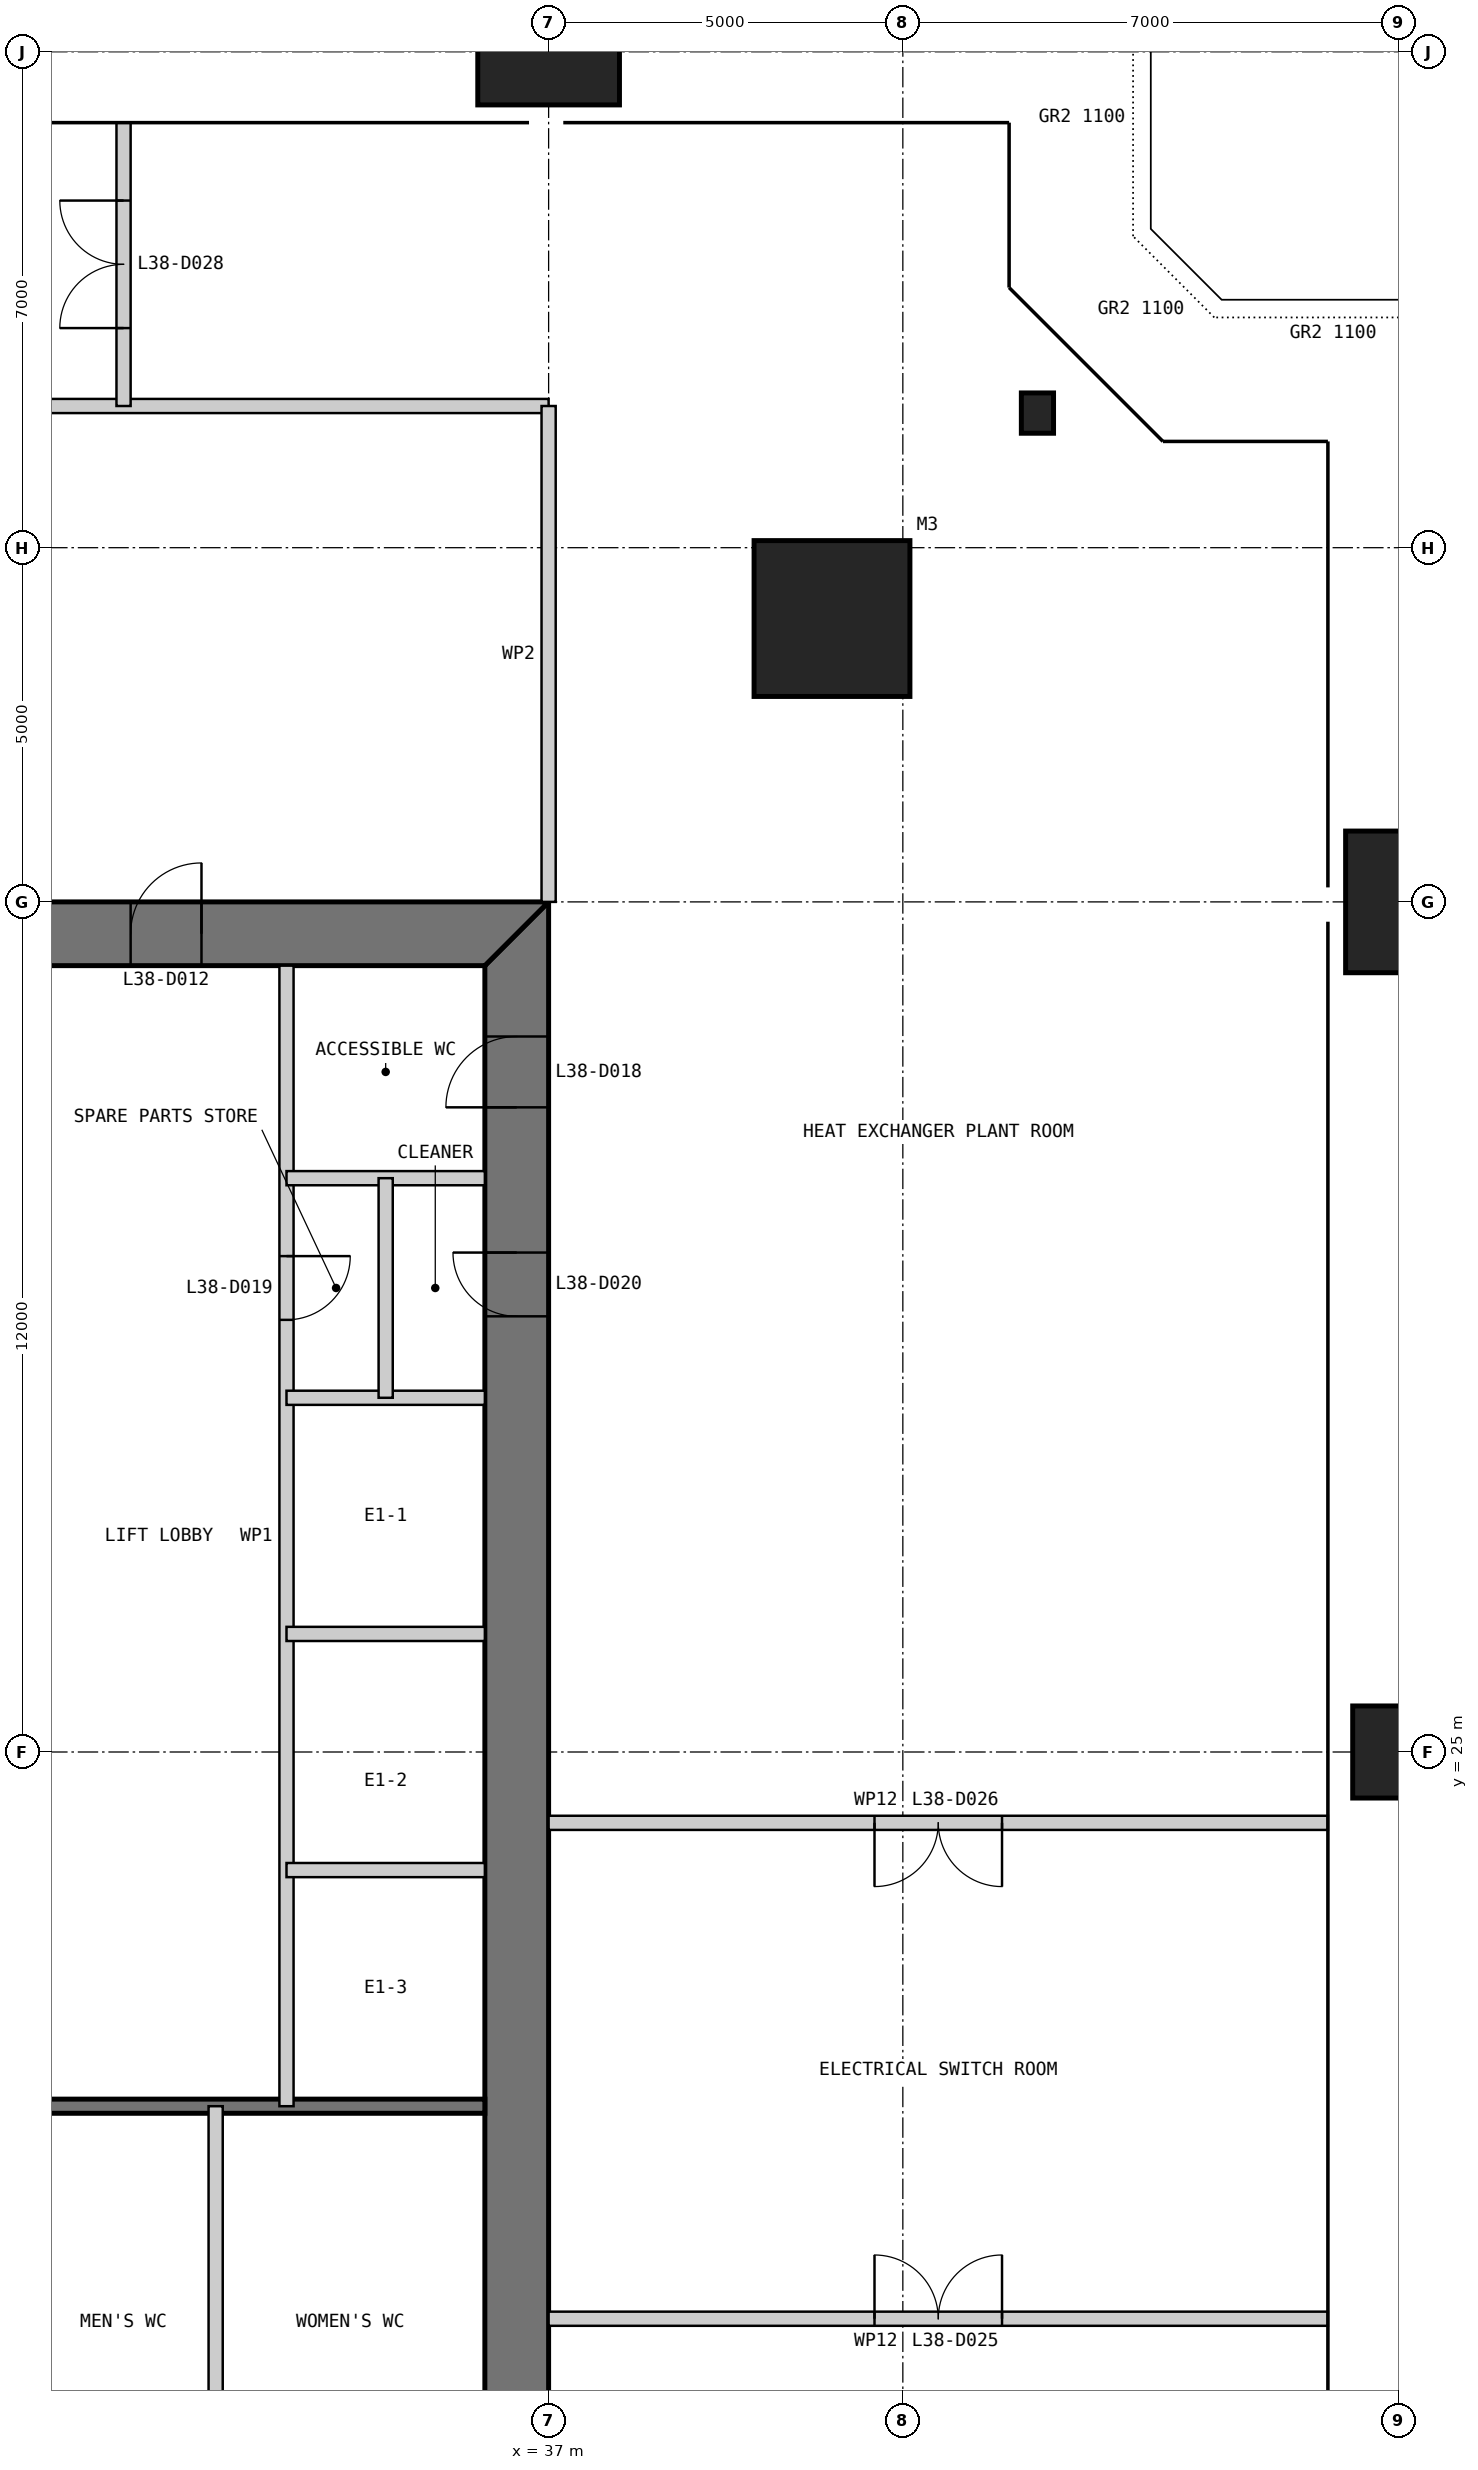
"""IFC4 building model, lengths in metres.
Left out: names, types, materials, properties, quantities, classifications, styles, units other than length and angle.
Written with IfcOpenShell. Run it as: python <this file> out.ifc"""

import sys

from ifc_helpers import new_model, si_unit, direction, frame, frame_2d, origin, origin_2d, place, context, subcontext, project, spatial, polyline, rectangle, i_section, outline, extrude, element, fill, save


model = new_model("IFC4")
c1 = context("Model", 3, precision=1e-05, world=origin(), true_north=direction((0.0, 1.0)))
c2 = subcontext(c1, "Body", "Model", "MODEL_VIEW")
j1 = project(units=[si_unit("LENGTHUNIT", "METRE"), si_unit("PLANEANGLEUNIT", "RADIAN")], contexts=[c1])
p1 = place(None, origin())
s1 = spatial("IfcSite", under=j1, at=p1, CompositionType="ELEMENT")
p2 = place(p1, origin())
s2 = spatial("IfcBuilding", under=s1, at=p2, CompositionType="ELEMENT")
p3 = place(p2, frame((0.0, 0.0, 162.4)))
s3 = spatial("IfcBuildingStorey", under=s2, at=p3, CompositionType="ELEMENT", Elevation=162.4)
p4 = place(p3, frame((41.0, 41.0, 0.0), z_axis=(0.0, 0.0, 1.0), x_axis=(1.0, 0.0, 0.0)))
e1 = element("IfcColumn", 1, at=p4, inside=s3, PredefinedType="COLUMN", context=c2, shape_type="SweptSolid", body=[
    extrude(rectangle(XDim=2.2, YDim=2.2, at=origin_2d()), origin(), (0.0, 0.0, 1.0), 6.0),
])
p5 = place(p3, frame((49.0, 25.0, 0.0), z_axis=(0.0, 0.0, 1.0), x_axis=(1.0, 0.0, 0.0)))
e2 = element("IfcColumn", 2, at=p5, inside=s3, PredefinedType="COLUMN", context=c2, shape_type="SweptSolid", body=[
    extrude(rectangle(XDim=1.3, YDim=1.3, at=origin_2d()), origin(), (0.0, 0.0, 1.0), 6.0),
])
p6 = place(p3, frame((49.0, 37.0, 0.0), z_axis=(0.0, 0.0, 1.0), x_axis=(1.0, 0.0, 0.0)))
e3 = element("IfcColumn", 3, at=p6, inside=s3, PredefinedType="COLUMN", context=c2, shape_type="SweptSolid", body=[
    extrude(rectangle(XDim=1.5, YDim=2.0, at=origin_2d()), origin(), (0.0, 0.0, 1.0), 6.0),
])
p7 = place(p3, frame((37.0, 49.0, 0.0), z_axis=(0.0, 0.0, 1.0), x_axis=(1.0, 0.0, 0.0)))
e4 = element("IfcColumn", 4, at=p7, inside=s3, PredefinedType="COLUMN", context=c2, shape_type="SweptSolid", body=[
    extrude(rectangle(XDim=2.0, YDim=1.5, at=origin_2d()), origin(), (0.0, 0.0, 1.0), 6.0),
])
p8 = place(p3, frame((43.9, 43.9, 0.0), z_axis=(0.0, 0.0, 1.0), x_axis=(1.0, 0.0, 0.0)))
e5 = element("IfcColumn", 5, at=p8, inside=s3, PredefinedType="COLUMN", context=c2, shape_type="SweptSolid", body=[
    extrude(i_section(OverallWidth=0.455, OverallDepth=0.569, WebThickness=0.078, FlangeThickness=0.125, at=origin_2d()), origin(), (0.0, 0.0, 1.0), 4.6),
])
p9 = place(p3, frame((36.55, 13.9, 0.0), z_axis=(0.0, 0.0, 1.0), x_axis=(0.0, 1.0, 0.0)))
e6 = element("IfcWall", 6, at=p9, inside=s3, PredefinedType="SHEAR", context=c2, shape_type="SweptSolid", body=[
    extrude(outline(polyline([(-0.9, -0.45), (23.1, -0.45), (22.2, 0.45), (0.0, 0.45), (-0.9, -0.45)])), origin(), (0.0, 0.0, 1.0), 6.0),
])
p10 = place(p9, frame((20.2, 0.0, 0.0)))
e7 = element("IfcOpeningElement", 7, at=p10, cuts=e6, PredefinedType="OPENING", context=c2, shape_type="SweptSolid", body=[
    extrude(rectangle(XDim=1.0, YDim=2.2, at=frame_2d((0.5, 1.1))), frame((0.0, 0.46, 0.0), z_axis=(0.0, -1.0, 0.0), x_axis=(1.0, 0.0, 0.0)), (0.0, 0.0, 1.0), 0.92),
])
p11 = place(p9, frame((17.25, 0.0, 0.0)))
e8 = element("IfcOpeningElement", 8, at=p11, cuts=e6, PredefinedType="OPENING", context=c2, shape_type="SweptSolid", body=[
    extrude(rectangle(XDim=0.9, YDim=2.2, at=frame_2d((0.45, 1.1))), frame((0.0, 0.46, 0.0), z_axis=(0.0, -1.0, 0.0), x_axis=(1.0, 0.0, 0.0)), (0.0, 0.0, 1.0), 0.92),
])
p12 = place(p3, frame((37.0, 36.55, 0.0), z_axis=(0.0, 0.0, 1.0), x_axis=(-1.0, 0.0, 0.0)))
e9 = element("IfcWall", 9, at=p12, inside=s3, PredefinedType="SHEAR", context=c2, shape_type="SweptSolid", body=[
    extrude(outline(polyline([(0.0, -0.45), (24.0, -0.45), (23.1, 0.45), (0.9, 0.45), (0.0, -0.45)])), origin(), (0.0, 0.0, 1.0), 6.0),
])
p13 = place(p12, frame((4.9, 0.0, 0.0)))
e10 = element("IfcOpeningElement", 10, at=p13, cuts=e9, PredefinedType="OPENING", context=c2, shape_type="SweptSolid", body=[
    extrude(rectangle(XDim=1.0, YDim=2.2, at=frame_2d((0.5, 1.1))), frame((0.0, 0.46, 0.0), z_axis=(0.0, -1.0, 0.0), x_axis=(1.0, 0.0, 0.0)), (0.0, 0.0, 1.0), 0.92),
])
p14 = place(p12, frame((8.9, 0.0, 0.0)))
e11 = element("IfcOpeningElement", 11, at=p14, cuts=e9, PredefinedType="OPENING", context=c2, shape_type="SweptSolid", body=[
    extrude(rectangle(XDim=1.1, YDim=2.2, at=frame_2d((0.55, 1.1))), frame((0.0, 0.46, 0.0), z_axis=(0.0, -1.0, 0.0), x_axis=(1.0, 0.0, 0.0)), (0.0, 0.0, 1.0), 0.92),
])
p15 = place(p12, frame((15.05, 0.0, 0.0)))
e12 = element("IfcOpeningElement", 12, at=p15, cuts=e9, PredefinedType="OPENING", context=c2, shape_type="SweptSolid", body=[
    extrude(rectangle(XDim=0.9, YDim=2.2, at=frame_2d((0.45, 1.1))), frame((0.0, 0.46, 0.0), z_axis=(0.0, -1.0, 0.0), x_axis=(1.0, 0.0, 0.0)), (0.0, 0.0, 1.0), 0.92),
])
p16 = place(p12, frame((17.9, 0.0, 0.0)))
e13 = element("IfcOpeningElement", 13, at=p16, cuts=e9, PredefinedType="OPENING", context=c2, shape_type="SweptSolid", body=[
    extrude(rectangle(XDim=1.0, YDim=2.2, at=frame_2d((0.5, 1.1))), frame((0.0, 0.46, 0.0), z_axis=(0.0, -1.0, 0.0), x_axis=(1.0, 0.0, 0.0)), (0.0, 0.0, 1.0), 0.92),
])
p17 = place(p12, frame((21.4, 0.0, 0.0)))
e14 = element("IfcOpeningElement", 14, at=p17, cuts=e9, PredefinedType="OPENING", context=c2, shape_type="SweptSolid", body=[
    extrude(rectangle(XDim=1.0, YDim=2.2, at=frame_2d((0.5, 1.1))), frame((0.0, 0.46, 0.0), z_axis=(0.0, -1.0, 0.0), x_axis=(1.0, 0.0, 0.0)), (0.0, 0.0, 1.0), 0.92),
])
p18 = place(p3, frame((20.3, 20.0, 0.0), z_axis=(0.0, 0.0, 1.0), x_axis=(1.0, 0.0, 0.0)))
e15 = element("IfcWall", 15, at=p18, inside=s3, PredefinedType="SOLIDWALL", context=c2, shape_type="SweptSolid", body=[
    extrude(rectangle(XDim=15.8, YDim=0.2, at=frame_2d((7.9, 0.0))), origin(), (0.0, 0.0, 1.0), 5.8),
])
p19 = place(p3, frame((32.3, 13.9, 0.0), z_axis=(0.0, 0.0, 1.0), x_axis=(0.0, 1.0, 0.0)))
e16 = element("IfcWall", 16, at=p19, inside=s3, PredefinedType="PARTITIONING", context=c2, shape_type="SweptSolid", body=[
    extrude(rectangle(XDim=6.1, YDim=0.2, at=frame_2d((3.05, 0.0))), origin(), (0.0, 0.0, 1.0), 5.8),
])
p20 = place(p3, frame((33.3, 36.1, 0.0), z_axis=(0.0, 0.0, 1.0), x_axis=(0.0, -1.0, 0.0)))
e17 = element("IfcWall", 17, at=p20, inside=s3, PredefinedType="PARTITIONING", context=c2, shape_type="SweptSolid", body=[
    extrude(rectangle(XDim=16.1, YDim=0.2, at=frame_2d((8.05, 0.0))), origin(), (0.0, 0.0, 1.0), 5.8),
])
p21 = place(p20, frame((4.1, 0.0, 0.0)))
e18 = element("IfcOpeningElement", 18, at=p21, cuts=e17, PredefinedType="OPENING", context=c2, shape_type="SweptSolid", body=[
    extrude(rectangle(XDim=0.9, YDim=2.2, at=frame_2d((0.45, 1.1))), frame((0.0, 0.11, 0.0), z_axis=(0.0, -1.0, 0.0), x_axis=(1.0, 0.0, 0.0)), (0.0, 0.0, 1.0), 0.22),
])
for number, where, z_axis, x_axis in (
    (19, (36.1, 30.0, 0.0), (0.0, 0.0, 1.0), (-1.0, 0.0, 0.0)),
    (20, (36.1, 26.667, 0.0), (0.0, 0.0, 1.0), (-1.0, 0.0, 0.0)),
    (21, (36.1, 23.333, 0.0), (0.0, 0.0, 1.0), (-1.0, 0.0, 0.0)),
    (22, (36.1, 33.1, 0.0), (0.0, 0.0, 1.0), (-1.0, 0.0, 0.0)),
):
    element("IfcWall", number, at=place(p3, frame(where, z_axis=z_axis, x_axis=x_axis)), inside=s3, PredefinedType="PARTITIONING", context=c2, shape_type="SweptSolid", body=[
        extrude(rectangle(XDim=2.8, YDim=0.2, at=frame_2d((1.4, 0.0))), origin(), (0.0, 0.0, 1.0), 5.8),
    ])
p22 = place(p3, frame((34.7, 33.1, 0.0), z_axis=(0.0, 0.0, 1.0), x_axis=(0.0, -1.0, 0.0)))
e23 = element("IfcWall", 23, at=p22, inside=s3, PredefinedType="PARTITIONING", context=c2, shape_type="SweptSolid", body=[
    extrude(rectangle(XDim=3.1, YDim=0.2, at=frame_2d((1.55, 0.0))), origin(), (0.0, 0.0, 1.0), 5.8),
])
p23 = place(p3, frame((13.0, 44.0, 0.0), z_axis=(0.0, 0.0, 1.0), x_axis=(1.0, 0.0, 0.0)))
e24 = element("IfcWall", 24, at=p23, inside=s3, PredefinedType="PARTITIONING", context=c2, shape_type="SweptSolid", body=[
    extrude(rectangle(XDim=24.0, YDim=0.2, at=frame_2d((12.0, 0.0))), origin(), (0.0, 0.0, 1.0), 5.8),
])
p24 = place(p23, frame((8.0, 0.0, 0.0)))
e25 = element("IfcOpeningElement", 25, at=p24, cuts=e24, PredefinedType="OPENING", context=c2, shape_type="SweptSolid", body=[
    extrude(rectangle(XDim=1.0, YDim=2.2, at=frame_2d((0.5, 1.1))), frame((0.0, 0.11, 0.0), z_axis=(0.0, -1.0, 0.0), x_axis=(1.0, 0.0, 0.0)), (0.0, 0.0, 1.0), 0.22),
])
p25 = place(p3, frame((37.0, 44.0, 0.0), z_axis=(0.0, 0.0, 1.0), x_axis=(0.0, -1.0, 0.0)))
e26 = element("IfcWall", 26, at=p25, inside=s3, PredefinedType="PARTITIONING", context=c2, shape_type="SweptSolid", body=[
    extrude(rectangle(XDim=7.0, YDim=0.2, at=frame_2d((3.5, 0.0))), origin(), (0.0, 0.0, 1.0), 4.807),
])
p26 = place(p3, frame((37.0, 17.0, 0.0), z_axis=(0.0, 0.0, 1.0), x_axis=(1.0, 0.0, 0.0)))
e27 = element("IfcWall", 27, at=p26, inside=s3, PredefinedType="PARTITIONING", context=c2, shape_type="SweptSolid", body=[
    extrude(rectangle(XDim=11.0, YDim=0.2, at=frame_2d((5.5, 0.0))), origin(), (0.0, 0.0, 1.0), 5.8),
])
p27 = place(p26, frame((4.6, 0.0, 0.0)))
e28 = element("IfcOpeningElement", 28, at=p27, cuts=e27, PredefinedType="OPENING", context=c2, shape_type="SweptSolid", body=[
    extrude(rectangle(XDim=1.8, YDim=2.4, at=frame_2d((0.9, 1.2))), frame((0.0, 0.11, 0.0), z_axis=(0.0, -1.0, 0.0), x_axis=(1.0, 0.0, 0.0)), (0.0, 0.0, 1.0), 0.22),
])
p28 = place(p3, frame((37.0, 24.0, 0.0), z_axis=(0.0, 0.0, 1.0), x_axis=(1.0, 0.0, 0.0)))
e29 = element("IfcWall", 29, at=p28, inside=s3, PredefinedType="PARTITIONING", context=c2, shape_type="SweptSolid", body=[
    extrude(rectangle(XDim=11.0, YDim=0.2, at=frame_2d((5.5, 0.0))), origin(), (0.0, 0.0, 1.0), 5.8),
])
p29 = place(p28, frame((4.6, 0.0, 0.0)))
e30 = element("IfcOpeningElement", 30, at=p29, cuts=e29, PredefinedType="OPENING", context=c2, shape_type="SweptSolid", body=[
    extrude(rectangle(XDim=1.8, YDim=2.4, at=frame_2d((0.9, 1.2))), frame((0.0, 0.11, 0.0), z_axis=(0.0, -1.0, 0.0), x_axis=(1.0, 0.0, 0.0)), (0.0, 0.0, 1.0), 0.22),
])
p30 = place(p3, frame((31.0, 44.0, 0.0), z_axis=(0.0, 0.0, 1.0), x_axis=(0.0, 1.0, 0.0)))
e31 = element("IfcWall", 31, at=p30, inside=s3, PredefinedType="PARTITIONING", context=c2, shape_type="SweptSolid", body=[
    extrude(rectangle(XDim=4.0, YDim=0.2, at=frame_2d((2.0, 0.0))), origin(), (0.0, 0.0, 1.0), 4.954),
])
p31 = place(p30, frame((1.1, 0.0, 0.0)))
e32 = element("IfcOpeningElement", 32, at=p31, cuts=e31, PredefinedType="OPENING", context=c2, shape_type="SweptSolid", body=[
    extrude(rectangle(XDim=1.8, YDim=2.4, at=frame_2d((0.9, 1.2))), frame((0.0, 0.11, 0.0), z_axis=(0.0, -1.0, 0.0), x_axis=(1.0, 0.0, 0.0)), (0.0, 0.0, 1.0), 0.22),
])
p32 = place(p13, frame((1.0, 0.0, 0.0), z_axis=(0.0, 0.0, 1.0), x_axis=(-1.0, 0.0, 0.0)))
e33 = element("IfcDoor", 33, at=p32, inside=s3, OperationType="SINGLE_SWING_RIGHT", PredefinedType="DOOR", context=c2, shape_type="SweptSolid", body=[
    extrude(rectangle(XDim=1.0, YDim=2.2, at=frame_2d((0.5, 1.1))), frame((0.0, 0.025, 0.0), z_axis=(0.0, -1.0, 0.0), x_axis=(1.0, 0.0, 0.0)), (0.0, 0.0, 1.0), 0.05),
    extrude(outline(polyline([(0.0, 0.0), (0.04, 0.0), (0.04, 2.16), (0.96, 2.16), (0.96, 0.0), (1.0, 0.0), (1.0, 2.2), (0.0, 2.2), (0.0, 0.0)])), frame((0.0, 0.3, 0.0), z_axis=(0.0, -1.0, 0.0), x_axis=(1.0, 0.0, 0.0)), (0.0, 0.0, 1.0), 0.6),
])
fill(e10, e33)
p33 = place(p10, origin())
e34 = element("IfcDoor", 34, at=p33, inside=s3, OperationType="SINGLE_SWING_LEFT", PredefinedType="DOOR", context=c2, shape_type="SweptSolid", body=[
    extrude(rectangle(XDim=1.0, YDim=2.2, at=frame_2d((0.5, 1.1))), frame((0.0, 0.025, 0.0), z_axis=(0.0, -1.0, 0.0), x_axis=(1.0, 0.0, 0.0)), (0.0, 0.0, 1.0), 0.05),
    extrude(outline(polyline([(0.0, 0.0), (0.04, 0.0), (0.04, 2.16), (0.96, 2.16), (0.96, 0.0), (1.0, 0.0), (1.0, 2.2), (0.0, 2.2), (0.0, 0.0)])), frame((0.0, 0.3, 0.0), z_axis=(0.0, -1.0, 0.0), x_axis=(1.0, 0.0, 0.0)), (0.0, 0.0, 1.0), 0.6),
])
fill(e7, e34)
p34 = place(p21, origin())
e35 = element("IfcDoor", 35, at=p34, inside=s3, OperationType="SINGLE_SWING_LEFT", PredefinedType="DOOR", context=c2, shape_type="SweptSolid", body=[
    extrude(rectangle(XDim=0.9, YDim=2.2, at=frame_2d((0.45, 1.1))), frame((0.0, 0.025, 0.0), z_axis=(0.0, -1.0, 0.0), x_axis=(1.0, 0.0, 0.0)), (0.0, 0.0, 1.0), 0.05),
])
fill(e18, e35)
p35 = place(p11, origin())
e36 = element("IfcDoor", 36, at=p35, inside=s3, OperationType="SINGLE_SWING_RIGHT", PredefinedType="DOOR", context=c2, shape_type="SweptSolid", body=[
    extrude(rectangle(XDim=0.9, YDim=2.2, at=frame_2d((0.45, 1.1))), frame((0.0, 0.025, 0.0), z_axis=(0.0, -1.0, 0.0), x_axis=(1.0, 0.0, 0.0)), (0.0, 0.0, 1.0), 0.05),
    extrude(outline(polyline([(0.0, 0.0), (0.04, 0.0), (0.04, 2.16), (0.86, 2.16), (0.86, 0.0), (0.9, 0.0), (0.9, 2.2), (0.0, 2.2), (0.0, 0.0)])), frame((0.0, 0.3, 0.0), z_axis=(0.0, -1.0, 0.0), x_axis=(1.0, 0.0, 0.0)), (0.0, 0.0, 1.0), 0.6),
])
fill(e8, e36)
p36 = place(p27, origin())
e37 = element("IfcDoor", 37, at=p36, inside=s3, OperationType="DOUBLE_DOOR_SINGLE_SWING", PredefinedType="DOOR", context=c2, shape_type="SweptSolid", body=[
    extrude(rectangle(XDim=1.8, YDim=2.4, at=frame_2d((0.9, 1.2))), frame((0.0, 0.025, 0.0), z_axis=(0.0, -1.0, 0.0), x_axis=(1.0, 0.0, 0.0)), (0.0, 0.0, 1.0), 0.05),
])
fill(e28, e37)
p37 = place(p29, frame((1.8, 0.0, 0.0), z_axis=(0.0, 0.0, 1.0), x_axis=(-1.0, 0.0, 0.0)))
e38 = element("IfcDoor", 38, at=p37, inside=s3, OperationType="DOUBLE_DOOR_SINGLE_SWING", PredefinedType="DOOR", context=c2, shape_type="SweptSolid", body=[
    extrude(rectangle(XDim=1.8, YDim=2.4, at=frame_2d((0.9, 1.2))), frame((0.0, 0.025, 0.0), z_axis=(0.0, -1.0, 0.0), x_axis=(1.0, 0.0, 0.0)), (0.0, 0.0, 1.0), 0.05),
])
fill(e30, e38)
p38 = place(p31, origin())
e39 = element("IfcDoor", 39, at=p38, inside=s3, OperationType="DOUBLE_DOOR_SINGLE_SWING", PredefinedType="DOOR", context=c2, shape_type="SweptSolid", body=[
    extrude(rectangle(XDim=1.8, YDim=2.4, at=frame_2d((0.9, 1.2))), frame((0.0, 0.025, 0.0), z_axis=(0.0, -1.0, 0.0), x_axis=(1.0, 0.0, 0.0)), (0.0, 0.0, 1.0), 0.05),
])
fill(e32, e39)
save(model, sys.argv[1])
